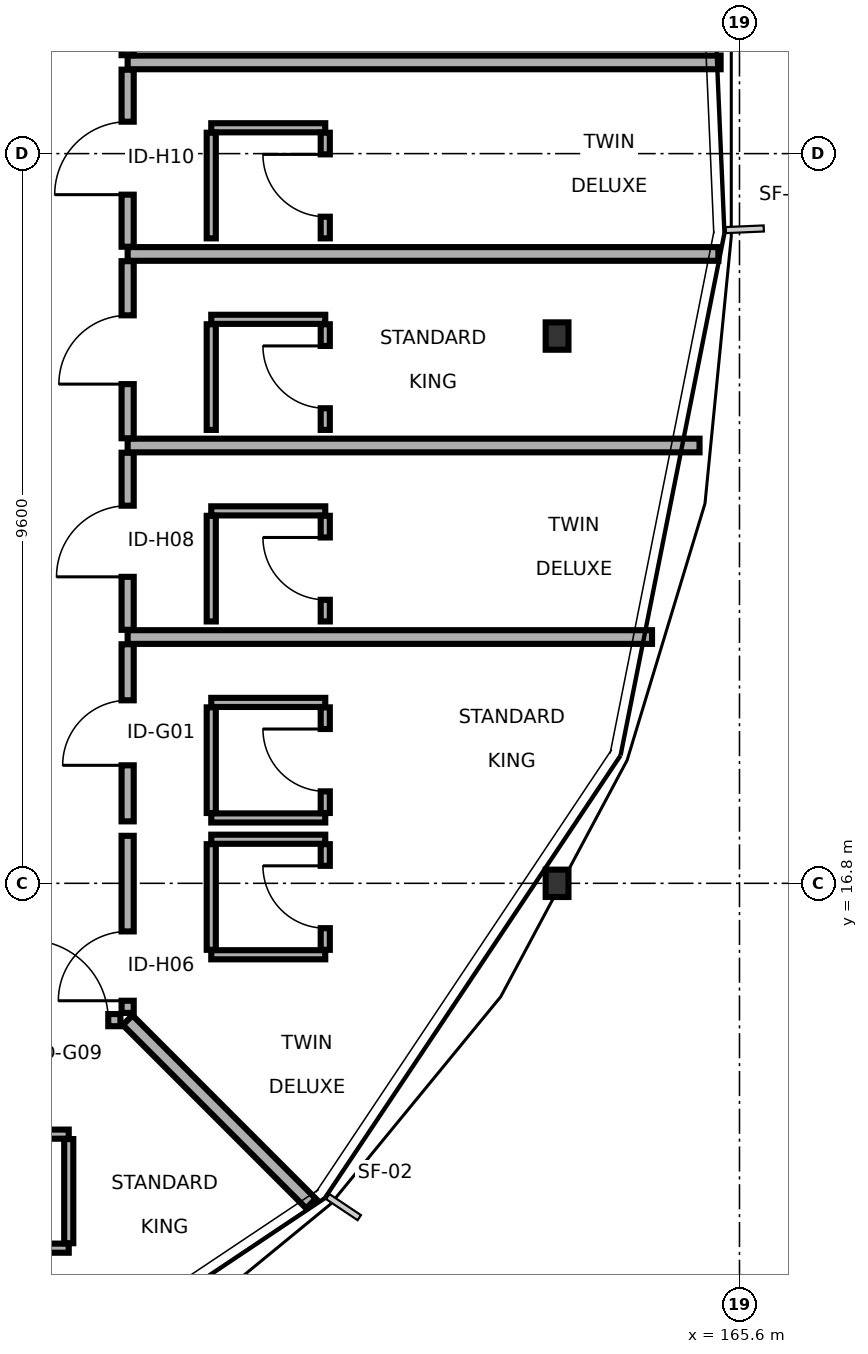
"""IFC4 building model, lengths in metres.
Left out: names, types, materials, properties, quantities, classifications, styles, units other than length and angle.
Written with IfcOpenShell. Run it as: python <this file> out.ifc"""

import sys

from ifc_helpers import new_model, si_unit, direction, frame, frame_2d, origin, origin_2d, place, context, subcontext, project, spatial, rectangle, i_section, extrude, element, fill, save


model = new_model("IFC4")
c1 = context("Model", 3, precision=1e-05, world=origin(), true_north=direction((0.0, 1.0)))
c2 = subcontext(c1, "Body", "Model", "MODEL_VIEW")
j1 = project(units=[si_unit("LENGTHUNIT", "METRE"), si_unit("PLANEANGLEUNIT", "RADIAN")], contexts=[c1])
p1 = place(None, origin())
s1 = spatial("IfcSite", under=j1, at=p1, CompositionType="ELEMENT")
p2 = place(p1, origin())
s2 = spatial("IfcBuilding", under=s1, at=p2, CompositionType="ELEMENT")
p3 = place(p2, frame((0.0, 0.0, 35.1)))
s3 = spatial("IfcBuildingStorey", under=s2, at=p3, CompositionType="ELEMENT", Elevation=35.1)
for number, where, z_axis, x_axis in (
    (1, (163.2, 16.8, 0.0), (0.0, 0.0, 1.0), (1.0, 0.0, 0.0)),
    (2, (163.2, 24.0, 0.0), (0.0, 0.0, 1.0), (1.0, 0.0, 0.0)),
):
    element("IfcColumn", number, at=place(p3, frame(where, z_axis=z_axis, x_axis=x_axis)), inside=s3, PredefinedType="COLUMN", context=c2, shape_type="SweptSolid", body=[
        extrude(i_section(OverallWidth=0.3, OverallDepth=0.36, WebThickness=0.012, FlangeThickness=0.022, FilletRadius=0.027, at=origin_2d()), origin(), (0.0, 0.0, 1.0), 3.4),
    ])
p4 = place(p3, frame((155.21, 15.0, 0.0), z_axis=(0.0, 0.0, 1.0), x_axis=(1.0, 0.0, 0.0)))
e3 = element("IfcWall", 3, at=p4, inside=s3, PredefinedType="PARTITIONING", context=c2, shape_type="SweptSolid", body=[
    extrude(rectangle(XDim=2.245, YDim=0.16, at=frame_2d((1.123, 0.0))), origin(), (0.0, 0.0, 1.0), 2.75),
])
p5 = place(p4, frame((1.03, 0.0, 0.0)))
e4 = element("IfcOpeningElement", 4, at=p5, cuts=e3, PredefinedType="OPENING", context=c2, shape_type="SweptSolid", body=[
    extrude(rectangle(XDim=1.055, YDim=2.05, at=frame_2d((0.527, 1.025))), frame((0.0, 0.09, 0.0), z_axis=(0.0, -1.0, 0.0), x_axis=(1.0, 0.0, 0.0)), (0.0, 0.0, 1.0), 0.18),
])
p6 = place(p3, frame((155.255, 12.0, 0.0), z_axis=(0.0, 0.0, 1.0), x_axis=(1.0, 0.0, 0.0)))
e5 = element("IfcWall", 5, at=p6, inside=s3, PredefinedType="PARTITIONING", context=c2, shape_type="SweptSolid", body=[
    extrude(rectangle(XDim=1.52, YDim=0.12, at=frame_2d((0.76, 0.0))), origin(), (0.0, 0.0, 1.0), 2.75),
])
p7 = place(p6, frame((0.35, 0.0, 0.0)))
e6 = element("IfcOpeningElement", 6, at=p7, cuts=e5, PredefinedType="OPENING", context=c2, shape_type="SweptSolid", body=[
    extrude(rectangle(XDim=0.82, YDim=2.08, at=frame_2d((0.41, 1.04))), frame((0.0, 0.07, 0.0), z_axis=(0.0, -1.0, 0.0), x_axis=(1.0, 0.0, 0.0)), (0.0, 0.0, 1.0), 0.14),
])
p8 = place(p3, frame((155.255, 13.5, 0.0), z_axis=(0.0, 0.0, 1.0), x_axis=(1.0, 0.0, 0.0)))
e7 = element("IfcWall", 7, at=p8, inside=s3, PredefinedType="PARTITIONING", context=c2, shape_type="SweptSolid", body=[
    extrude(rectangle(XDim=1.52, YDim=0.12, at=frame_2d((0.76, 0.0))), origin(), (0.0, 0.0, 1.0), 2.75),
])
p9 = place(p3, frame((156.775, 12.065, 0.0), z_axis=(0.0, 0.0, 1.0), x_axis=(0.0, 1.0, 0.0)))
e8 = element("IfcWall", 8, at=p9, inside=s3, PredefinedType="PARTITIONING", context=c2, shape_type="SweptSolid", body=[
    extrude(rectangle(XDim=1.37, YDim=0.12, at=frame_2d((0.685, 0.0))), origin(), (0.0, 0.0, 1.0), 3.165),
])
p10 = place(p3, frame((157.55, 15.0, 0.0), z_axis=(0.0, 0.0, 1.0), x_axis=(0.707106781187, -0.707106781187, 0.0)))
e9 = element("IfcWall", 9, at=p10, inside=s3, PredefinedType="PARTITIONING", context=c2, shape_type="SweptSolid", body=[
    extrude(rectangle(XDim=3.413, YDim=0.18, at=frame_2d((1.706, 0.0))), origin(), (0.0, 0.0, 1.0), 2.65),
])
p11 = place(p3, frame((157.55, 15.095, 0.0), z_axis=(0.0, 0.0, 1.0), x_axis=(0.0, 1.0, 0.0)))
e10 = element("IfcWall", 10, at=p11, inside=s3, PredefinedType="PARTITIONING", context=c2, shape_type="SweptSolid", body=[
    extrude(rectangle(XDim=2.33, YDim=0.16, at=frame_2d((1.165, 0.0))), origin(), (0.0, 0.0, 1.0), 2.75),
])
p12 = place(p11, frame((0.16, 0.0, 0.0)))
e11 = element("IfcOpeningElement", 11, at=p12, cuts=e10, PredefinedType="OPENING", context=c2, shape_type="SweptSolid", body=[
    extrude(rectangle(XDim=0.912, YDim=2.13, at=frame_2d((0.456, 1.065))), frame((0.0, 0.09, 0.0), z_axis=(0.0, -1.0, 0.0), x_axis=(1.0, 0.0, 0.0)), (0.0, 0.0, 1.0), 0.18),
])
for number, where, z_axis, x_axis in (
    (12, (158.65, 15.86, 0.0), (0.0, 0.0, 1.0), (1.0, 0.0, 0.0)),
    (13, (158.65, 17.38, 0.0), (0.0, 0.0, 1.0), (1.0, 0.0, 0.0)),
):
    element("IfcWall", number, at=place(p3, frame(where, z_axis=z_axis, x_axis=x_axis)), inside=s3, PredefinedType="PARTITIONING", context=c2, shape_type="SweptSolid", body=[
        extrude(rectangle(XDim=1.5, YDim=0.12, at=frame_2d((0.75, 0.0))), origin(), (0.0, 0.0, 1.0), 3.165),
    ])
p13 = place(p3, frame((158.65, 15.925, 0.0), z_axis=(0.0, 0.0, 1.0), x_axis=(0.0, 1.0, 0.0)))
e14 = element("IfcWall", 14, at=p13, inside=s3, PredefinedType="PARTITIONING", context=c2, shape_type="SweptSolid", body=[
    extrude(rectangle(XDim=1.39, YDim=0.12, at=frame_2d((0.695, 0.0))), origin(), (0.0, 0.0, 1.0), 2.75),
])
p14 = place(p3, frame((160.15, 15.925, 0.0), z_axis=(0.0, 0.0, 1.0), x_axis=(0.0, 1.0, 0.0)))
e15 = element("IfcWall", 15, at=p14, inside=s3, PredefinedType="PARTITIONING", context=c2, shape_type="SweptSolid", body=[
    extrude(rectangle(XDim=1.39, YDim=0.12, at=frame_2d((0.695, 0.0))), origin(), (0.0, 0.0, 1.0), 2.75),
])
p15 = place(p14, frame((0.285, 0.0, 0.0)))
e16 = element("IfcOpeningElement", 16, at=p15, cuts=e15, PredefinedType="OPENING", context=c2, shape_type="SweptSolid", body=[
    extrude(rectangle(XDim=0.82, YDim=2.08, at=frame_2d((0.41, 1.04))), frame((0.0, 0.07, 0.0), z_axis=(0.0, -1.0, 0.0), x_axis=(1.0, 0.0, 0.0)), (0.0, 0.0, 1.0), 0.14),
])
p16 = place(p3, frame((157.55, 17.615, 0.0), z_axis=(0.0, 0.0, 1.0), x_axis=(0.0, 1.0, 0.0)))
e17 = element("IfcWall", 17, at=p16, inside=s3, PredefinedType="PARTITIONING", context=c2, shape_type="SweptSolid", body=[
    extrude(rectangle(XDim=2.33, YDim=0.16, at=frame_2d((1.165, 0.0))), origin(), (0.0, 0.0, 1.0), 3.165),
])
p17 = place(p16, frame((0.738, 0.0, 0.0)))
e18 = element("IfcOpeningElement", 18, at=p17, cuts=e17, PredefinedType="OPENING", context=c2, shape_type="SweptSolid", body=[
    extrude(rectangle(XDim=0.855, YDim=2.05, at=frame_2d((0.427, 1.025))), frame((0.0, 0.09, 0.0), z_axis=(0.0, -1.0, 0.0), x_axis=(1.0, 0.0, 0.0)), (0.0, 0.0, 1.0), 0.18),
])
for number, where, z_axis, x_axis in (
    (19, (158.65, 17.66, 0.0), (0.0, 0.0, 1.0), (1.0, 0.0, 0.0)),
    (20, (158.65, 19.18, 0.0), (0.0, 0.0, 1.0), (1.0, 0.0, 0.0)),
):
    element("IfcWall", number, at=place(p3, frame(where, z_axis=z_axis, x_axis=x_axis)), inside=s3, PredefinedType="PARTITIONING", context=c2, shape_type="SweptSolid", body=[
        extrude(rectangle(XDim=1.5, YDim=0.12, at=frame_2d((0.75, 0.0))), origin(), (0.0, 0.0, 1.0), 3.165),
    ])
p18 = place(p3, frame((158.65, 17.725, 0.0), z_axis=(0.0, 0.0, 1.0), x_axis=(0.0, 1.0, 0.0)))
e21 = element("IfcWall", 21, at=p18, inside=s3, PredefinedType="PARTITIONING", context=c2, shape_type="SweptSolid", body=[
    extrude(rectangle(XDim=1.39, YDim=0.12, at=frame_2d((0.695, 0.0))), origin(), (0.0, 0.0, 1.0), 3.165),
])
p19 = place(p3, frame((160.15, 17.725, 0.0), z_axis=(0.0, 0.0, 1.0), x_axis=(0.0, 1.0, 0.0)))
e22 = element("IfcWall", 22, at=p19, inside=s3, PredefinedType="PARTITIONING", context=c2, shape_type="SweptSolid", body=[
    extrude(rectangle(XDim=1.39, YDim=0.12, at=frame_2d((0.695, 0.0))), origin(), (0.0, 0.0, 1.0), 3.165),
])
p20 = place(p19, frame((0.285, 0.0, 0.0)))
e23 = element("IfcOpeningElement", 23, at=p20, cuts=e22, PredefinedType="OPENING", context=c2, shape_type="SweptSolid", body=[
    extrude(rectangle(XDim=0.82, YDim=2.08, at=frame_2d((0.41, 1.04))), frame((0.0, 0.07, 0.0), z_axis=(0.0, -1.0, 0.0), x_axis=(1.0, 0.0, 0.0)), (0.0, 0.0, 1.0), 0.14),
])
p21 = place(p3, frame((157.55, 20.04, 0.0), z_axis=(0.0, 0.0, 1.0), x_axis=(1.0, 0.0, 0.0)))
e24 = element("IfcWall", 24, at=p21, inside=s3, PredefinedType="PARTITIONING", context=c2, shape_type="SweptSolid", body=[
    extrude(rectangle(XDim=6.899, YDim=0.18, at=frame_2d((3.45, 0.0))), origin(), (0.0, 0.0, 1.0), 2.65),
])
p22 = place(p3, frame((157.55, 20.135, 0.0), z_axis=(0.0, 0.0, 1.0), x_axis=(0.0, 1.0, 0.0)))
e25 = element("IfcWall", 25, at=p22, inside=s3, PredefinedType="PARTITIONING", context=c2, shape_type="SweptSolid", body=[
    extrude(rectangle(XDim=2.33, YDim=0.16, at=frame_2d((1.165, 0.0))), origin(), (0.0, 0.0, 1.0), 3.165),
])
p23 = place(p22, frame((0.697, 0.0, 0.0)))
e26 = element("IfcOpeningElement", 26, at=p23, cuts=e25, PredefinedType="OPENING", context=c2, shape_type="SweptSolid", body=[
    extrude(rectangle(XDim=0.936, YDim=2.07, at=frame_2d((0.468, 1.035))), frame((0.0, 0.09, 0.0), z_axis=(0.0, -1.0, 0.0), x_axis=(1.0, 0.0, 0.0)), (0.0, 0.0, 1.0), 0.18),
])
p24 = place(p3, frame((158.65, 21.7, 0.0), z_axis=(0.0, 0.0, 1.0), x_axis=(1.0, 0.0, 0.0)))
e27 = element("IfcWall", 27, at=p24, inside=s3, PredefinedType="PARTITIONING", context=c2, shape_type="SweptSolid", body=[
    extrude(rectangle(XDim=1.5, YDim=0.12, at=frame_2d((0.75, 0.0))), origin(), (0.0, 0.0, 1.0), 3.165),
])
p25 = place(p3, frame((158.65, 20.245, 0.0), z_axis=(0.0, 0.0, 1.0), x_axis=(0.0, 1.0, 0.0)))
e28 = element("IfcWall", 28, at=p25, inside=s3, PredefinedType="PARTITIONING", context=c2, shape_type="SweptSolid", body=[
    extrude(rectangle(XDim=1.39, YDim=0.12, at=frame_2d((0.695, 0.0))), origin(), (0.0, 0.0, 1.0), 3.165),
])
p26 = place(p3, frame((160.15, 20.245, 0.0), z_axis=(0.0, 0.0, 1.0), x_axis=(0.0, 1.0, 0.0)))
e29 = element("IfcWall", 29, at=p26, inside=s3, PredefinedType="PARTITIONING", context=c2, shape_type="SweptSolid", body=[
    extrude(rectangle(XDim=1.39, YDim=0.12, at=frame_2d((0.695, 0.0))), origin(), (0.0, 0.0, 1.0), 3.165),
])
p27 = place(p26, frame((0.285, 0.0, 0.0)))
e30 = element("IfcOpeningElement", 30, at=p27, cuts=e29, PredefinedType="OPENING", context=c2, shape_type="SweptSolid", body=[
    extrude(rectangle(XDim=0.82, YDim=2.08, at=frame_2d((0.41, 1.04))), frame((0.0, 0.07, 0.0), z_axis=(0.0, -1.0, 0.0), x_axis=(1.0, 0.0, 0.0)), (0.0, 0.0, 1.0), 0.14),
])
p28 = place(p3, frame((157.55, 22.56, 0.0), z_axis=(0.0, 0.0, 1.0), x_axis=(1.0, 0.0, 0.0)))
e31 = element("IfcWall", 31, at=p28, inside=s3, PredefinedType="PARTITIONING", context=c2, shape_type="SweptSolid", body=[
    extrude(rectangle(XDim=7.524, YDim=0.18, at=frame_2d((3.762, 0.0))), origin(), (0.0, 0.0, 1.0), 2.65),
])
p29 = place(p3, frame((157.55, 22.655, 0.0), z_axis=(0.0, 0.0, 1.0), x_axis=(0.0, 1.0, 0.0)))
e32 = element("IfcWall", 32, at=p29, inside=s3, PredefinedType="PARTITIONING", context=c2, shape_type="SweptSolid", body=[
    extrude(rectangle(XDim=2.33, YDim=0.16, at=frame_2d((1.165, 0.0))), origin(), (0.0, 0.0, 1.0), 2.75),
])
p30 = place(p29, frame((0.712, 0.0, 0.0)))
e33 = element("IfcOpeningElement", 33, at=p30, cuts=e32, PredefinedType="OPENING", context=c2, shape_type="SweptSolid", body=[
    extrude(rectangle(XDim=0.905, YDim=2.05, at=frame_2d((0.453, 1.025))), frame((0.0, 0.09, 0.0), z_axis=(0.0, -1.0, 0.0), x_axis=(1.0, 0.0, 0.0)), (0.0, 0.0, 1.0), 0.18),
])
p31 = place(p3, frame((158.65, 24.22, 0.0), z_axis=(0.0, 0.0, 1.0), x_axis=(1.0, 0.0, 0.0)))
e34 = element("IfcWall", 34, at=p31, inside=s3, PredefinedType="PARTITIONING", context=c2, shape_type="SweptSolid", body=[
    extrude(rectangle(XDim=1.5, YDim=0.12, at=frame_2d((0.75, 0.0))), origin(), (0.0, 0.0, 1.0), 2.75),
])
p32 = place(p3, frame((158.65, 22.765, 0.0), z_axis=(0.0, 0.0, 1.0), x_axis=(0.0, 1.0, 0.0)))
e35 = element("IfcWall", 35, at=p32, inside=s3, PredefinedType="PARTITIONING", context=c2, shape_type="SweptSolid", body=[
    extrude(rectangle(XDim=1.39, YDim=0.12, at=frame_2d((0.695, 0.0))), origin(), (0.0, 0.0, 1.0), 2.75),
])
p33 = place(p3, frame((160.15, 22.765, 0.0), z_axis=(0.0, 0.0, 1.0), x_axis=(0.0, 1.0, 0.0)))
e36 = element("IfcWall", 36, at=p33, inside=s3, PredefinedType="PARTITIONING", context=c2, shape_type="SweptSolid", body=[
    extrude(rectangle(XDim=1.39, YDim=0.12, at=frame_2d((0.695, 0.0))), origin(), (0.0, 0.0, 1.0), 2.75),
])
p34 = place(p33, frame((0.285, 0.0, 0.0)))
e37 = element("IfcOpeningElement", 37, at=p34, cuts=e36, PredefinedType="OPENING", context=c2, shape_type="SweptSolid", body=[
    extrude(rectangle(XDim=0.82, YDim=2.08, at=frame_2d((0.41, 1.04))), frame((0.0, 0.07, 0.0), z_axis=(0.0, -1.0, 0.0), x_axis=(1.0, 0.0, 0.0)), (0.0, 0.0, 1.0), 0.14),
])
p35 = place(p3, frame((157.55, 25.08, 0.0), z_axis=(0.0, 0.0, 1.0), x_axis=(1.0, 0.0, 0.0)))
e38 = element("IfcWall", 38, at=p35, inside=s3, PredefinedType="PARTITIONING", context=c2, shape_type="SweptSolid", body=[
    extrude(rectangle(XDim=7.773, YDim=0.18, at=frame_2d((3.886, 0.0))), origin(), (0.0, 0.0, 1.0), 2.65),
])
p36 = place(p3, frame((157.55, 25.175, 0.0), z_axis=(0.0, 0.0, 1.0), x_axis=(0.0, 1.0, 0.0)))
e39 = element("IfcWall", 39, at=p36, inside=s3, PredefinedType="PARTITIONING", context=c2, shape_type="SweptSolid", body=[
    extrude(rectangle(XDim=2.33, YDim=0.16, at=frame_2d((1.165, 0.0))), origin(), (0.0, 0.0, 1.0), 3.165),
])
p37 = place(p36, frame((0.685, 0.0, 0.0)))
e40 = element("IfcOpeningElement", 40, at=p37, cuts=e39, PredefinedType="OPENING", context=c2, shape_type="SweptSolid", body=[
    extrude(rectangle(XDim=0.96, YDim=2.13, at=frame_2d((0.48, 1.065))), frame((0.0, 0.09, 0.0), z_axis=(0.0, -1.0, 0.0), x_axis=(1.0, 0.0, 0.0)), (0.0, 0.0, 1.0), 0.18),
])
p38 = place(p3, frame((158.65, 26.74, 0.0), z_axis=(0.0, 0.0, 1.0), x_axis=(1.0, 0.0, 0.0)))
e41 = element("IfcWall", 41, at=p38, inside=s3, PredefinedType="PARTITIONING", context=c2, shape_type="SweptSolid", body=[
    extrude(rectangle(XDim=1.5, YDim=0.12, at=frame_2d((0.75, 0.0))), origin(), (0.0, 0.0, 1.0), 3.165),
])
p39 = place(p3, frame((158.65, 25.285, 0.0), z_axis=(0.0, 0.0, 1.0), x_axis=(0.0, 1.0, 0.0)))
e42 = element("IfcWall", 42, at=p39, inside=s3, PredefinedType="PARTITIONING", context=c2, shape_type="SweptSolid", body=[
    extrude(rectangle(XDim=1.39, YDim=0.12, at=frame_2d((0.695, 0.0))), origin(), (0.0, 0.0, 1.0), 3.165),
])
p40 = place(p3, frame((160.15, 25.285, 0.0), z_axis=(0.0, 0.0, 1.0), x_axis=(0.0, 1.0, 0.0)))
e43 = element("IfcWall", 43, at=p40, inside=s3, PredefinedType="PARTITIONING", context=c2, shape_type="SweptSolid", body=[
    extrude(rectangle(XDim=1.39, YDim=0.12, at=frame_2d((0.695, 0.0))), origin(), (0.0, 0.0, 1.0), 3.165),
])
p41 = place(p40, frame((0.285, 0.0, 0.0)))
e44 = element("IfcOpeningElement", 44, at=p41, cuts=e43, PredefinedType="OPENING", context=c2, shape_type="SweptSolid", body=[
    extrude(rectangle(XDim=0.82, YDim=2.08, at=frame_2d((0.41, 1.04))), frame((0.0, 0.07, 0.0), z_axis=(0.0, -1.0, 0.0), x_axis=(1.0, 0.0, 0.0)), (0.0, 0.0, 1.0), 0.14),
])
p42 = place(p3, frame((157.55, 27.6, 0.0), z_axis=(0.0, 0.0, 1.0), x_axis=(1.0, 0.0, 0.0)))
e45 = element("IfcWall", 45, at=p42, inside=s3, PredefinedType="PARTITIONING", context=c2, shape_type="SweptSolid", body=[
    extrude(rectangle(XDim=7.802, YDim=0.18, at=frame_2d((3.901, 0.0))), origin(), (0.0, 0.0, 1.0), 2.65),
])
p43 = place(p3, frame((157.55, 27.695, 0.0), z_axis=(0.0, 0.0, 1.0), x_axis=(0.0, 1.0, 0.0)))
e46 = element("IfcWall", 46, at=p43, inside=s3, PredefinedType="PARTITIONING", context=c2, shape_type="SweptSolid", body=[
    extrude(rectangle(XDim=2.33, YDim=0.16, at=frame_2d((1.165, 0.0))), origin(), (0.0, 0.0, 1.0), 3.165),
])
p44 = place(p43, frame((0.688, 0.0, 0.0)))
e47 = element("IfcOpeningElement", 47, at=p44, cuts=e46, PredefinedType="OPENING", context=c2, shape_type="SweptSolid", body=[
    extrude(rectangle(XDim=0.955, YDim=2.05, at=frame_2d((0.478, 1.025))), frame((0.0, 0.09, 0.0), z_axis=(0.0, -1.0, 0.0), x_axis=(1.0, 0.0, 0.0)), (0.0, 0.0, 1.0), 0.18),
])
p45 = place(p5, origin())
e48 = element("IfcDoor", 48, at=p45, inside=s3, OperationType="SINGLE_SWING_LEFT", PredefinedType="DOOR", context=c2, shape_type="SweptSolid", body=[
    extrude(rectangle(XDim=1.055, YDim=2.05, at=frame_2d((0.527, 1.025))), frame((0.0, 0.025, 0.0), z_axis=(0.0, -1.0, 0.0), x_axis=(1.0, 0.0, 0.0)), (0.0, 0.0, 1.0), 0.05),
])
fill(e4, e48)
p46 = place(p12, origin())
e49 = element("IfcDoor", 49, at=p46, inside=s3, OperationType="SINGLE_SWING_LEFT", PredefinedType="DOOR", context=c2, shape_type="SweptSolid", body=[
    extrude(rectangle(XDim=0.912, YDim=2.13, at=frame_2d((0.456, 1.065))), frame((0.0, 0.025, 0.0), z_axis=(0.0, -1.0, 0.0), x_axis=(1.0, 0.0, 0.0)), (0.0, 0.0, 1.0), 0.05),
])
fill(e11, e49)
p47 = place(p15, origin())
e50 = element("IfcDoor", 50, at=p47, inside=s3, OperationType="SINGLE_SWING_RIGHT", PredefinedType="DOOR", context=c2, shape_type="SweptSolid", body=[
    extrude(rectangle(XDim=0.82, YDim=2.08, at=frame_2d((0.41, 1.04))), frame((0.0, 0.025, 0.0), z_axis=(0.0, -1.0, 0.0), x_axis=(1.0, 0.0, 0.0)), (0.0, 0.0, 1.0), 0.05),
])
fill(e16, e50)
p48 = place(p17, origin())
e51 = element("IfcDoor", 51, at=p48, inside=s3, OperationType="SINGLE_SWING_LEFT", PredefinedType="DOOR", context=c2, shape_type="SweptSolid", body=[
    extrude(rectangle(XDim=0.855, YDim=2.05, at=frame_2d((0.427, 1.025))), frame((0.0, 0.025, 0.0), z_axis=(0.0, -1.0, 0.0), x_axis=(1.0, 0.0, 0.0)), (0.0, 0.0, 1.0), 0.05),
])
fill(e18, e51)
p49 = place(p20, origin())
e52 = element("IfcDoor", 52, at=p49, inside=s3, OperationType="SINGLE_SWING_RIGHT", PredefinedType="DOOR", context=c2, shape_type="SweptSolid", body=[
    extrude(rectangle(XDim=0.82, YDim=2.08, at=frame_2d((0.41, 1.04))), frame((0.0, 0.025, 0.0), z_axis=(0.0, -1.0, 0.0), x_axis=(1.0, 0.0, 0.0)), (0.0, 0.0, 1.0), 0.05),
])
fill(e23, e52)
p50 = place(p23, origin())
e53 = element("IfcDoor", 53, at=p50, inside=s3, OperationType="SINGLE_SWING_LEFT", PredefinedType="DOOR", context=c2, shape_type="SweptSolid", body=[
    extrude(rectangle(XDim=0.936, YDim=2.07, at=frame_2d((0.468, 1.035))), frame((0.0, 0.025, 0.0), z_axis=(0.0, -1.0, 0.0), x_axis=(1.0, 0.0, 0.0)), (0.0, 0.0, 1.0), 0.05),
])
fill(e26, e53)
p51 = place(p27, origin())
e54 = element("IfcDoor", 54, at=p51, inside=s3, OperationType="SINGLE_SWING_RIGHT", PredefinedType="DOOR", context=c2, shape_type="SweptSolid", body=[
    extrude(rectangle(XDim=0.82, YDim=2.08, at=frame_2d((0.41, 1.04))), frame((0.0, 0.025, 0.0), z_axis=(0.0, -1.0, 0.0), x_axis=(1.0, 0.0, 0.0)), (0.0, 0.0, 1.0), 0.05),
])
fill(e30, e54)
p52 = place(p30, origin())
e55 = element("IfcDoor", 55, at=p52, inside=s3, OperationType="SINGLE_SWING_LEFT", PredefinedType="DOOR", context=c2, shape_type="SweptSolid", body=[
    extrude(rectangle(XDim=0.905, YDim=2.05, at=frame_2d((0.453, 1.025))), frame((0.0, 0.025, 0.0), z_axis=(0.0, -1.0, 0.0), x_axis=(1.0, 0.0, 0.0)), (0.0, 0.0, 1.0), 0.05),
])
fill(e33, e55)
p53 = place(p34, origin())
e56 = element("IfcDoor", 56, at=p53, inside=s3, OperationType="SINGLE_SWING_RIGHT", PredefinedType="DOOR", context=c2, shape_type="SweptSolid", body=[
    extrude(rectangle(XDim=0.82, YDim=2.08, at=frame_2d((0.41, 1.04))), frame((0.0, 0.025, 0.0), z_axis=(0.0, -1.0, 0.0), x_axis=(1.0, 0.0, 0.0)), (0.0, 0.0, 1.0), 0.05),
])
fill(e37, e56)
p54 = place(p37, origin())
e57 = element("IfcDoor", 57, at=p54, inside=s3, OperationType="SINGLE_SWING_LEFT", PredefinedType="DOOR", context=c2, shape_type="SweptSolid", body=[
    extrude(rectangle(XDim=0.96, YDim=2.13, at=frame_2d((0.48, 1.065))), frame((0.0, 0.025, 0.0), z_axis=(0.0, -1.0, 0.0), x_axis=(1.0, 0.0, 0.0)), (0.0, 0.0, 1.0), 0.05),
])
fill(e40, e57)
p55 = place(p41, origin())
e58 = element("IfcDoor", 58, at=p55, inside=s3, OperationType="SINGLE_SWING_RIGHT", PredefinedType="DOOR", context=c2, shape_type="SweptSolid", body=[
    extrude(rectangle(XDim=0.82, YDim=2.08, at=frame_2d((0.41, 1.04))), frame((0.0, 0.025, 0.0), z_axis=(0.0, -1.0, 0.0), x_axis=(1.0, 0.0, 0.0)), (0.0, 0.0, 1.0), 0.05),
])
fill(e44, e58)
save(model, sys.argv[1])
